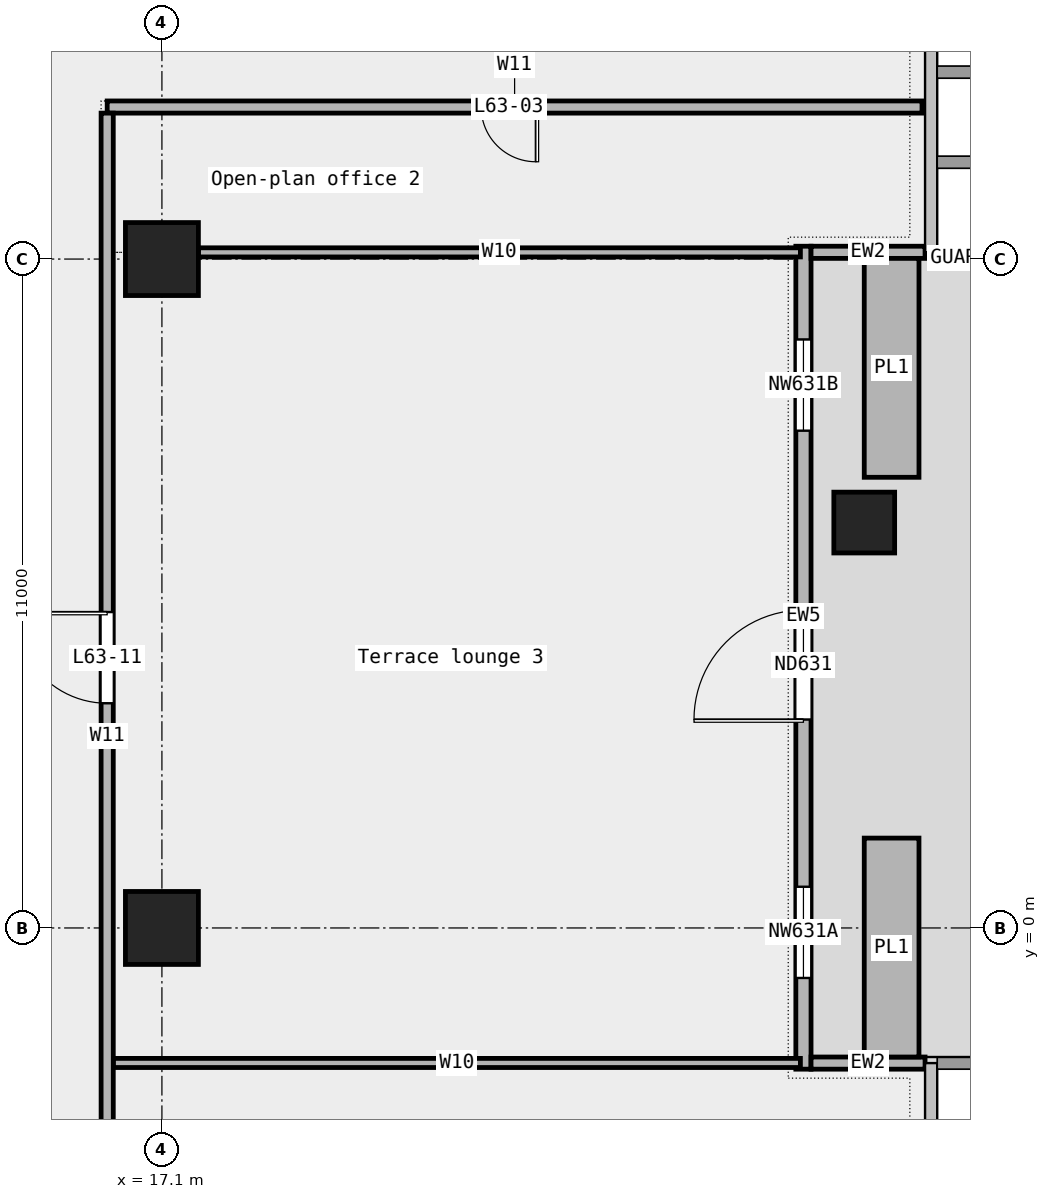
"""IFC4 building model, lengths in metres.
Left out: names, types, materials, properties, quantities, classifications, styles, units other than length and angle.
Written with IfcOpenShell. Run it as: python <this file> out.ifc"""

import sys

from ifc_helpers import new_model, si_unit, direction, frame, frame_2d, origin, origin_2d, place, context, subcontext, project, spatial, rectangle, extrude, element, fill, save


model = new_model("IFC4")
c1 = context("Model", 3, precision=1e-05, world=origin(), true_north=direction((0.0, 1.0)))
c2 = subcontext(c1, "Body", "Model", "MODEL_VIEW")
j1 = project(units=[si_unit("LENGTHUNIT", "METRE"), si_unit("PLANEANGLEUNIT", "RADIAN")], contexts=[c1])
p1 = place(None, origin())
s1 = spatial("IfcSite", under=j1, at=p1, CompositionType="ELEMENT")
p2 = place(p1, origin())
s2 = spatial("IfcBuilding", under=s1, at=p2, CompositionType="ELEMENT")
p3 = place(p2, frame((0.0, 0.0, 291.4)))
s3 = spatial("IfcBuildingStorey", under=s2, at=p3, CompositionType="ELEMENT", Elevation=291.4)
p4 = place(p3, frame((28.65, 6.667, 0.0), z_axis=(0.0, 0.0, 1.0), x_axis=(1.0, 0.0, 0.0)))
e1 = element("IfcColumn", 1, at=p4, inside=s3, PredefinedType="COLUMN", context=c2, shape_type="SweptSolid", body=[
    extrude(rectangle(XDim=1.0, YDim=1.0, at=origin_2d()), origin(), (0.0, 0.0, 1.0), 3.6),
])
for number, where, z_axis, x_axis in (
    (2, (17.1, 0.0, 0.0), (0.0, 0.0, 1.0), (1.0, 0.0, 0.0)),
    (3, (17.1, 11.0, 0.0), (0.0, 0.0, 1.0), (1.0, 0.0, 0.0)),
):
    element("IfcColumn", number, at=place(p3, frame(where, z_axis=z_axis, x_axis=x_axis)), inside=s3, PredefinedType="COLUMN", context=c2, shape_type="SweptSolid", body=[
        extrude(rectangle(XDim=1.2, YDim=1.2, at=origin_2d()), origin(), (0.0, 0.0, 1.0), 3.6),
    ])
p5 = place(p3, frame((27.65, -2.322, 0.0), z_axis=(0.0, 0.0, 1.0), x_axis=(0.0, 1.0, 0.0)))
e4 = element("IfcWall", 4, at=p5, inside=s3, PredefinedType="STANDARD", context=c2, shape_type="SweptSolid", body=[
    extrude(rectangle(XDim=13.533, YDim=0.25, at=frame_2d((6.767, 0.0))), origin(), (0.0, 0.0, 1.0), 3.6),
])
p6 = place(p5, frame((1.5, 0.0, 0.45)))
e5 = element("IfcOpeningElement", 5, at=p6, cuts=e4, PredefinedType="OPENING", context=c2, shape_type="SweptSolid", body=[
    extrude(rectangle(XDim=1.5, YDim=2.4, at=frame_2d((0.75, 1.2))), frame((0.0, 0.137, 0.0), z_axis=(0.0, -1.0, 0.0), x_axis=(1.0, 0.0, 0.0)), (0.0, 0.0, 1.0), 0.274),
])
p7 = place(p5, frame((5.75, 0.0, 0.0)))
e6 = element("IfcOpeningElement", 6, at=p7, cuts=e4, PredefinedType="OPENING", context=c2, shape_type="SweptSolid", body=[
    extrude(rectangle(XDim=1.8, YDim=2.4, at=frame_2d((0.9, 1.2))), frame((0.0, 0.137, 0.0), z_axis=(0.0, -1.0, 0.0), x_axis=(1.0, 0.0, 0.0)), (0.0, 0.0, 1.0), 0.274),
])
p8 = place(p5, frame((10.5, 0.0, 0.45)))
e7 = element("IfcOpeningElement", 7, at=p8, cuts=e4, PredefinedType="OPENING", context=c2, shape_type="SweptSolid", body=[
    extrude(rectangle(XDim=1.5, YDim=2.4, at=frame_2d((0.75, 1.2))), frame((0.0, 0.137, 0.0), z_axis=(0.0, -1.0, 0.0), x_axis=(1.0, 0.0, 0.0)), (0.0, 0.0, 1.0), 0.274),
])
for number, where, z_axis, x_axis in (
    (8, (29.65, -2.222, 0.0), (0.0, 0.0, 1.0), (-1.0, 0.0, 0.0)),
    (9, (29.65, 11.111, 0.0), (0.0, 0.0, 1.0), (-1.0, 0.0, 0.0)),
):
    element("IfcWall", number, at=place(p3, frame(where, z_axis=z_axis, x_axis=x_axis)), inside=s3, PredefinedType="STANDARD", context=c2, shape_type="SweptSolid", body=[
        extrude(rectangle(XDim=1.875, YDim=0.2, at=frame_2d((0.938, 0.0))), origin(), (0.0, 0.0, 1.0), 3.6),
    ])
for number, where, z_axis, x_axis in (
    (10, (29.1, -2.122, 0.0), (0.0, 0.0, 1.0), (0.0, 1.0, 0.0)),
    (11, (29.1, 7.411, 0.0), (0.0, 0.0, 1.0), (0.0, 1.0, 0.0)),
):
    element("IfcWall", number, at=place(p3, frame(where, z_axis=z_axis, x_axis=x_axis)), inside=s3, PredefinedType="STANDARD", context=c2, shape_type="SweptSolid", body=[
        extrude(rectangle(XDim=3.6, YDim=0.9, at=frame_2d((1.8, 0.0))), origin(), (0.0, 0.0, 1.0), 0.7),
    ])
p9 = place(p3, frame((16.3, -2.22, 0.0), z_axis=(0.0, 0.0, 1.0), x_axis=(1.0, 0.0, 0.0)))
e12 = element("IfcWall", 12, at=p9, inside=s3, PredefinedType="PARTITIONING", context=c2, shape_type="SweptSolid", body=[
    extrude(rectangle(XDim=11.3, YDim=0.15, at=frame_2d((5.65, 0.0))), origin(), (0.0, 0.0, 1.0), 3.6),
])
p10 = place(p3, frame((17.7, 11.11, 0.0), z_axis=(0.0, 0.0, 1.0), x_axis=(1.0, 0.0, 0.0)))
e13 = element("IfcWall", 13, at=p10, inside=s3, PredefinedType="PARTITIONING", context=c2, shape_type="SweptSolid", body=[
    extrude(rectangle(XDim=9.9, YDim=0.15, at=frame_2d((4.95, 0.0))), origin(), (0.0, 0.0, 1.0), 3.6),
])
p11 = place(p3, frame((16.2, 13.5, 0.0), z_axis=(0.0, 0.0, 1.0), x_axis=(1.0, 0.0, 0.0)))
e14 = element("IfcWall", 14, at=p11, inside=s3, PredefinedType="PARTITIONING", context=c2, shape_type="SweptSolid", body=[
    extrude(rectangle(XDim=13.4, YDim=0.2, at=frame_2d((6.7, 0.0))), origin(), (0.0, 0.0, 1.0), 3.6),
])
p12 = place(p11, frame((6.15, 0.0, 0.0)))
e15 = element("IfcOpeningElement", 15, at=p12, cuts=e14, PredefinedType="OPENING", context=c2, shape_type="SweptSolid", body=[
    extrude(rectangle(XDim=0.9, YDim=2.1, at=frame_2d((0.45, 1.05))), frame((0.0, 0.112, 0.0), z_axis=(0.0, -1.0, 0.0), x_axis=(1.0, 0.0, 0.0)), (0.0, 0.0, 1.0), 0.224),
])
p13 = place(p3, frame((16.2, -7.1, 0.0), z_axis=(0.0, 0.0, 1.0), x_axis=(0.0, 1.0, 0.0)))
e16 = element("IfcWall", 16, at=p13, inside=s3, PredefinedType="PARTITIONING", context=c2, shape_type="SweptSolid", body=[
    extrude(rectangle(XDim=20.5, YDim=0.2, at=frame_2d((10.25, 0.0))), origin(), (0.0, 0.0, 1.0), 3.6),
])
p14 = place(p13, frame((10.795, 0.0, 0.0)))
e17 = element("IfcOpeningElement", 17, at=p14, cuts=e16, PredefinedType="OPENING", context=c2, shape_type="SweptSolid", body=[
    extrude(rectangle(XDim=1.5, YDim=2.1, at=frame_2d((0.75, 1.05))), frame((0.0, 0.112, 0.0), z_axis=(0.0, -1.0, 0.0), x_axis=(1.0, 0.0, 0.0)), (0.0, 0.0, 1.0), 0.224),
])
p15 = place(p6, origin())
e18 = element("IfcWindow", 18, at=p15, inside=s3, PartitioningType="SINGLE_PANEL", PredefinedType="WINDOW", context=c2, shape_type="SweptSolid", body=[
    extrude(rectangle(XDim=1.5, YDim=2.4, at=frame_2d((0.75, 1.2))), frame((0.0, 0.03, 0.0), z_axis=(0.0, -1.0, 0.0), x_axis=(1.0, 0.0, 0.0)), (0.0, 0.0, 1.0), 0.06),
])
fill(e5, e18)
p16 = place(p7, origin())
e19 = element("IfcDoor", 19, at=p16, inside=s3, OperationType="DOUBLE_DOOR_SINGLE_SWING", PredefinedType="DOOR", context=c2, shape_type="SweptSolid", body=[
    extrude(rectangle(XDim=1.8, YDim=2.4, at=frame_2d((0.9, 1.2))), frame((0.0, 0.025, 0.0), z_axis=(0.0, -1.0, 0.0), x_axis=(1.0, 0.0, 0.0)), (0.0, 0.0, 1.0), 0.05),
])
fill(e6, e19)
p17 = place(p8, origin())
e20 = element("IfcWindow", 20, at=p17, inside=s3, PartitioningType="SINGLE_PANEL", PredefinedType="WINDOW", context=c2, shape_type="SweptSolid", body=[
    extrude(rectangle(XDim=1.5, YDim=2.4, at=frame_2d((0.75, 1.2))), frame((0.0, 0.03, 0.0), z_axis=(0.0, -1.0, 0.0), x_axis=(1.0, 0.0, 0.0)), (0.0, 0.0, 1.0), 0.06),
])
fill(e7, e20)
p18 = place(p12, origin())
e21 = element("IfcDoor", 21, at=p18, inside=s3, OperationType="SINGLE_SWING_LEFT", PredefinedType="DOOR", context=c2, shape_type="SweptSolid", body=[
    extrude(rectangle(XDim=0.9, YDim=2.1, at=frame_2d((0.45, 1.05))), frame((0.0, 0.025, 0.0), z_axis=(0.0, -1.0, 0.0), x_axis=(1.0, 0.0, 0.0)), (0.0, 0.0, 1.0), 0.05),
])
fill(e15, e21)
p19 = place(p14, origin())
e22 = element("IfcDoor", 22, at=p19, inside=s3, OperationType="DOUBLE_DOOR_SINGLE_SWING", PredefinedType="DOOR", context=c2, shape_type="SweptSolid", body=[
    extrude(rectangle(XDim=1.5, YDim=2.1, at=frame_2d((0.75, 1.05))), frame((0.0, 0.025, 0.0), z_axis=(0.0, -1.0, 0.0), x_axis=(1.0, 0.0, 0.0)), (0.0, 0.0, 1.0), 0.05),
])
fill(e17, e22)
save(model, sys.argv[1])
